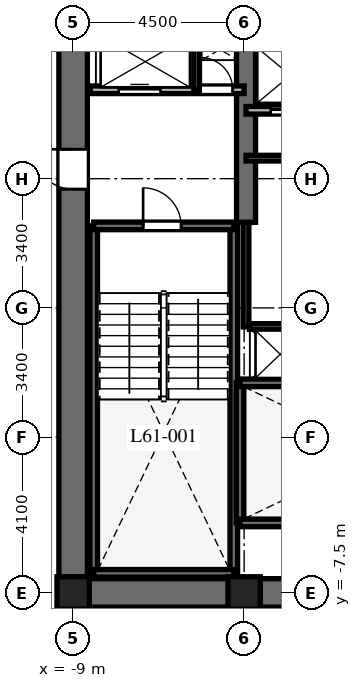
"""IFC4 building model, lengths in metres.
Left out: names, types, materials, properties, quantities, classifications, styles, units other than length and angle.
Written with IfcOpenShell. Run it as: python <this file> out.ifc"""

import sys

from ifc_helpers import new_model, si_unit, direction, frame, frame_2d, origin, origin_2d, place, context, subcontext, project, spatial, rectangle, extrude, element, fill, save


model = new_model("IFC4")
c1 = context("Model", 3, precision=1e-05, world=origin(), true_north=direction((0.0, 1.0)))
c2 = subcontext(c1, "Body", "Model", "MODEL_VIEW")
j1 = project(units=[si_unit("LENGTHUNIT", "METRE"), si_unit("PLANEANGLEUNIT", "RADIAN")], contexts=[c1])
p1 = place(None, origin())
s1 = spatial("IfcSite", under=j1, at=p1, CompositionType="ELEMENT")
p2 = place(p1, origin())
s2 = spatial("IfcBuilding", under=s1, at=p2, CompositionType="ELEMENT")
p3 = place(p2, frame((0.0, 0.0, 244.5)))
s3 = spatial("IfcBuildingStorey", under=s2, at=p3, CompositionType="ELEMENT", Elevation=244.5)
p4 = place(p3, frame((-9.375, -7.5, 0.0), z_axis=(0.0, 0.0, 1.0), x_axis=(1.0, 0.0, 0.0)))
e1 = element("IfcWall", 1, at=p4, inside=s3, PredefinedType="SHEAR", context=c2, shape_type="SweptSolid", body=[
    extrude(rectangle(XDim=18.75, YDim=0.75, at=frame_2d((9.375, 0.0))), origin(), (0.0, 0.0, 1.0), 3.8),
])
p5 = place(p4, frame((9.425, 0.0, 0.0)))
e2 = element("IfcOpeningElement", 2, at=p5, cuts=e1, PredefinedType="OPENING", context=c2, shape_type="SweptSolid", body=[
    extrude(rectangle(XDim=1.0, YDim=2.15, at=frame_2d((0.5, 1.075))), frame((0.0, 0.385, 0.0), z_axis=(0.0, -1.0, 0.0), x_axis=(1.0, 0.0, 0.0)), (0.0, 0.0, 1.0), 0.77),
])
p6 = place(p3, frame((-9.0, -7.125, 0.0), z_axis=(0.0, 0.0, 1.0), x_axis=(0.0, 1.0, 0.0)))
e3 = element("IfcWall", 3, at=p6, inside=s3, PredefinedType="SHEAR", context=c2, shape_type="SweptSolid", body=[
    extrude(rectangle(XDim=14.25, YDim=0.75, at=frame_2d((7.125, 0.0))), origin(), (0.0, 0.0, 1.0), 3.8),
])
p7 = place(p6, frame((10.25, 0.0, 0.0)))
e4 = element("IfcOpeningElement", 4, at=p7, cuts=e3, PredefinedType="OPENING", context=c2, shape_type="SweptSolid", body=[
    extrude(rectangle(XDim=1.05, YDim=2.15, at=frame_2d((0.525, 1.075))), frame((0.0, 0.385, 0.0), z_axis=(0.0, -1.0, 0.0), x_axis=(1.0, 0.0, 0.0)), (0.0, 0.0, 1.0), 0.77),
])
p8 = place(p3, frame((-4.45, 2.25, 0.0), z_axis=(0.0, 0.0, 1.0), x_axis=(0.0, 1.0, 0.0)))
e5 = element("IfcWall", 5, at=p8, inside=s3, PredefinedType="SHEAR", context=c2, shape_type="SweptSolid", body=[
    extrude(rectangle(XDim=4.875, YDim=0.5, at=frame_2d((2.438, 0.0))), origin(), (0.0, 0.0, 1.0), 3.8),
])
for number, where, z_axis, x_axis in (
    (6, (-8.458, -6.985, 0.0), (0.0, 0.0, 1.0), (0.0, 1.0, 0.0)),
    (7, (-4.772, -6.985, 0.0), (0.0, 0.0, 1.0), (0.0, 1.0, 0.0)),
):
    element("IfcWall", number, at=place(p3, frame(where, z_axis=z_axis, x_axis=x_axis)), inside=s3, PredefinedType="SHEAR", context=c2, shape_type="SweptSolid", body=[
        extrude(rectangle(XDim=9.143, YDim=0.2, at=frame_2d((4.572, 0.0))), origin(), (0.0, 0.0, 1.0), 3.8),
    ])
p9 = place(p3, frame((-8.458, -6.985, 0.0), z_axis=(0.0, 0.0, 1.0), x_axis=(1.0, 0.0, 0.0)))
e8 = element("IfcWall", 8, at=p9, inside=s3, PredefinedType="SHEAR", context=c2, shape_type="SweptSolid", body=[
    extrude(rectangle(XDim=3.686, YDim=0.2, at=frame_2d((1.843, 0.0))), origin(), (0.0, 0.0, 1.0), 3.8),
])
p10 = place(p3, frame((-8.458, 2.158, 0.0), z_axis=(0.0, 0.0, 1.0), x_axis=(1.0, 0.0, 0.0)))
e9 = element("IfcWall", 9, at=p10, inside=s3, PredefinedType="SHEAR", context=c2, shape_type="SweptSolid", body=[
    extrude(rectangle(XDim=3.686, YDim=0.2, at=frame_2d((1.843, 0.0))), origin(), (0.0, 0.0, 1.0), 3.8),
])
p11 = place(p10, frame((1.3, 0.0, 0.0)))
e10 = element("IfcOpeningElement", 10, at=p11, cuts=e9, PredefinedType="OPENING", context=c2, shape_type="SweptSolid", body=[
    extrude(rectangle(XDim=1.0, YDim=2.15, at=frame_2d((0.5, 1.075))), frame((0.0, 0.11, 0.0), z_axis=(0.0, -1.0, 0.0), x_axis=(1.0, 0.0, 0.0)), (0.0, 0.0, 1.0), 0.22),
])
p12 = place(p3, frame((-4.608, -5.658, 0.0), z_axis=(0.0, 0.0, 1.0), x_axis=(0.0, 1.0, 0.0)))
e11 = element("IfcWall", 11, at=p12, inside=s3, PredefinedType="SHEAR", context=c2, shape_type="SweptSolid", body=[
    extrude(rectangle(XDim=3.686, YDim=0.2, at=frame_2d((1.843, 0.0))), origin(), (0.0, 0.0, 1.0), 3.8),
])
p13 = place(p3, frame((-4.608, -5.658, 0.0), z_axis=(0.0, 0.0, 1.0), x_axis=(1.0, 0.0, 0.0)))
e12 = element("IfcWall", 12, at=p13, inside=s3, PredefinedType="SHEAR", context=c2, shape_type="SweptSolid", body=[
    extrude(rectangle(XDim=9.166, YDim=0.2, at=frame_2d((4.583, 0.0))), origin(), (0.0, 0.0, 1.0), 3.8),
])
p14 = place(p13, frame((7.45, 0.0, 0.0)))
e13 = element("IfcOpeningElement", 13, at=p14, cuts=e12, PredefinedType="OPENING", context=c2, shape_type="SweptSolid", body=[
    extrude(rectangle(XDim=1.0, YDim=2.15, at=frame_2d((0.5, 1.075))), frame((0.0, 0.11, 0.0), z_axis=(0.0, -1.0, 0.0), x_axis=(1.0, 0.0, 0.0)), (0.0, 0.0, 1.0), 0.22),
])
p15 = place(p3, frame((-4.608, -1.972, 0.0), z_axis=(0.0, 0.0, 1.0), x_axis=(1.0, 0.0, 0.0)))
e14 = element("IfcWall", 14, at=p15, inside=s3, PredefinedType="SHEAR", context=c2, shape_type="SweptSolid", body=[
    extrude(rectangle(XDim=9.166, YDim=0.2, at=frame_2d((4.583, 0.0))), origin(), (0.0, 0.0, 1.0), 3.8),
])
for number, where, z_axis, x_axis in (
    (15, (-9.0, -7.5, 0.0), (0.0, 0.0, 1.0), (1.0, 0.0, 0.0)),
    (16, (-4.5, -7.5, 0.0), (0.0, 0.0, 1.0), (1.0, 0.0, 0.0)),
):
    element("IfcColumn", number, at=place(p3, frame(where, z_axis=z_axis, x_axis=x_axis)), inside=s3, PredefinedType="COLUMN", context=c2, shape_type="SweptSolid", body=[
        extrude(rectangle(XDim=0.85, YDim=0.85, at=origin_2d()), origin(), (0.0, 0.0, 1.0), 3.8),
    ])
p16 = place(p3, frame((-8.55, 5.74, 0.0), z_axis=(0.0, 0.0, 1.0), x_axis=(1.0, 0.0, 0.0)))
e17 = element("IfcWall", 17, at=p16, inside=s3, PredefinedType="PARTITIONING", context=c2, shape_type="SweptSolid", body=[
    extrude(rectangle(XDim=4.05, YDim=0.2, at=frame_2d((2.025, 0.0))), origin(), (0.0, 0.0, 1.0), 3.5),
])
p17 = place(p16, frame((0.75, 0.0, 0.0)))
e18 = element("IfcOpeningElement", 18, at=p17, cuts=e17, PredefinedType="OPENING", context=c2, shape_type="SweptSolid", body=[
    extrude(rectangle(XDim=1.1, YDim=2.2, at=frame_2d((0.55, 1.1))), frame((0.0, 0.11, 0.0), z_axis=(0.0, -1.0, 0.0), x_axis=(1.0, 0.0, 0.0)), (0.0, 0.0, 1.0), 0.22),
])
p18 = place(p16, frame((2.9, 0.0, 0.0)))
e19 = element("IfcOpeningElement", 19, at=p18, cuts=e17, PredefinedType="OPENING", context=c2, shape_type="SweptSolid", body=[
    extrude(rectangle(XDim=0.85, YDim=2.03, at=frame_2d((0.425, 1.015))), frame((0.0, 0.11, 0.0), z_axis=(0.0, -1.0, 0.0), x_axis=(1.0, 0.0, 0.0)), (0.0, 0.0, 1.0), 0.22),
])
p19 = place(p3, frame((-5.75, 5.74, 0.0), z_axis=(0.0, 0.0, 1.0), x_axis=(0.0, 1.0, 0.0)))
e20 = element("IfcWall", 20, at=p19, inside=s3, PredefinedType="PARTITIONING", context=c2, shape_type="SweptSolid", body=[
    extrude(rectangle(XDim=1.41, YDim=0.15, at=frame_2d((0.705, 0.0))), origin(), (0.0, 0.0, 1.0), 3.5),
])
p20 = place(p3, frame((-4.45, 5.2, 0.0), z_axis=(0.0, 0.0, 1.0), x_axis=(1.0, 0.0, 0.0)))
e21 = element("IfcWall", 21, at=p20, inside=s3, PredefinedType="PARTITIONING", context=c2, shape_type="SweptSolid", body=[
    extrude(rectangle(XDim=4.5, YDim=0.2, at=frame_2d((2.25, 0.0))), origin(), (0.0, 0.0, 1.0), 3.5),
])
p21 = place(p20, frame((0.65, 0.0, 0.0)))
e22 = element("IfcOpeningElement", 22, at=p21, cuts=e21, PredefinedType="OPENING", context=c2, shape_type="SweptSolid", body=[
    extrude(rectangle(XDim=1.0, YDim=2.2, at=frame_2d((0.5, 1.1))), frame((0.0, 0.11, 0.0), z_axis=(0.0, -1.0, 0.0), x_axis=(1.0, 0.0, 0.0)), (0.0, 0.0, 1.0), 0.22),
])
p22 = place(p20, frame((2.85, 0.0, 0.0)))
e23 = element("IfcOpeningElement", 23, at=p22, cuts=e21, PredefinedType="OPENING", context=c2, shape_type="SweptSolid", body=[
    extrude(rectangle(XDim=1.0, YDim=2.2, at=frame_2d((0.5, 1.1))), frame((0.0, 0.11, 0.0), z_axis=(0.0, -1.0, 0.0), x_axis=(1.0, 0.0, 0.0)), (0.0, 0.0, 1.0), 0.22),
])
p23 = place(p3, frame((-4.45, -0.5, 0.0), z_axis=(0.0, 0.0, 1.0), x_axis=(0.0, 1.0, 0.0)))
e24 = element("IfcWall", 24, at=p23, inside=s3, PredefinedType="PARTITIONING", context=c2, shape_type="SweptSolid", body=[
    extrude(rectangle(XDim=2.75, YDim=0.15, at=frame_2d((1.375, 0.0))), origin(), (0.0, 0.0, 1.0), 3.5),
])
p24 = place(p3, frame((-4.45, 3.94, 0.0), z_axis=(0.0, 0.0, 1.0), x_axis=(1.0, 0.0, 0.0)))
e25 = element("IfcWall", 25, at=p24, inside=s3, PredefinedType="PARTITIONING", context=c2, shape_type="SweptSolid", body=[
    extrude(rectangle(XDim=2.55, YDim=0.15, at=frame_2d((1.275, 0.0))), origin(), (0.0, 0.0, 1.0), 3.5),
])
p25 = place(p3, frame((-4.36, -0.49, 0.0), z_axis=(0.0, 0.0, 1.0), x_axis=(1.0, 0.0, 0.0)))
e26 = element("IfcWall", 26, at=p25, inside=s3, PredefinedType="PARTITIONING", context=c2, shape_type="SweptSolid", body=[
    extrude(rectangle(XDim=8.72, YDim=0.15, at=frame_2d((4.36, 0.0))), origin(), (0.0, 0.0, 1.0), 3.5),
])
p26 = place(p25, frame((3.16, 0.0, 0.0)))
e27 = element("IfcOpeningElement", 27, at=p26, cuts=e26, PredefinedType="OPENING", context=c2, shape_type="SweptSolid", body=[
    extrude(rectangle(XDim=0.85, YDim=2.03, at=frame_2d((0.425, 1.015))), frame((0.0, 0.085, 0.0), z_axis=(0.0, -1.0, 0.0), x_axis=(1.0, 0.0, 0.0)), (0.0, 0.0, 1.0), 0.17),
])
p27 = place(p25, frame((5.21, 0.0, 0.0)))
e28 = element("IfcOpeningElement", 28, at=p27, cuts=e26, PredefinedType="OPENING", context=c2, shape_type="SweptSolid", body=[
    extrude(rectangle(XDim=0.85, YDim=2.03, at=frame_2d((0.425, 1.015))), frame((0.0, 0.085, 0.0), z_axis=(0.0, -1.0, 0.0), x_axis=(1.0, 0.0, 0.0)), (0.0, 0.0, 1.0), 0.17),
])
p28 = place(p11, origin())
e29 = element("IfcDoor", 29, at=p28, inside=s3, OperationType="SINGLE_SWING_LEFT", PredefinedType="DOOR", context=c2, shape_type="SweptSolid", body=[
    extrude(rectangle(XDim=1.0, YDim=2.15, at=frame_2d((0.5, 1.075))), frame((0.0, 0.025, 0.0), z_axis=(0.0, -1.0, 0.0), x_axis=(1.0, 0.0, 0.0)), (0.0, 0.0, 1.0), 0.05),
])
fill(e10, e29)
p29 = place(p7, origin())
e30 = element("IfcDoor", 30, at=p29, inside=s3, OperationType="SINGLE_SWING_RIGHT", PredefinedType="DOOR", context=c2, shape_type="SweptSolid", body=[
    extrude(rectangle(XDim=1.05, YDim=2.15, at=frame_2d((0.525, 1.075))), frame((0.0, 0.025, 0.0), z_axis=(0.0, -1.0, 0.0), x_axis=(1.0, 0.0, 0.0)), (0.0, 0.0, 1.0), 0.05),
])
fill(e4, e30)
p30 = place(p17, origin())
e31 = element("IfcDoor", 31, at=p30, inside=s3, OperationType="SLIDING_TO_LEFT", PredefinedType="DOOR", context=c2, shape_type="SweptSolid", body=[
    extrude(rectangle(XDim=1.1, YDim=2.2, at=frame_2d((0.55, 1.1))), frame((0.0, 0.025, 0.0), z_axis=(0.0, -1.0, 0.0), x_axis=(1.0, 0.0, 0.0)), (0.0, 0.0, 1.0), 0.05),
])
fill(e18, e31)
p31 = place(p18, origin())
e32 = element("IfcDoor", 32, at=p31, inside=s3, OperationType="SINGLE_SWING_LEFT", PredefinedType="DOOR", context=c2, shape_type="SweptSolid", body=[
    extrude(rectangle(XDim=0.85, YDim=2.03, at=frame_2d((0.425, 1.015))), frame((0.0, 0.025, 0.0), z_axis=(0.0, -1.0, 0.0), x_axis=(1.0, 0.0, 0.0)), (0.0, 0.0, 1.0), 0.05),
])
fill(e19, e32)
p32 = place(p21, origin())
e33 = element("IfcDoor", 33, at=p32, inside=s3, OperationType="SLIDING_TO_LEFT", PredefinedType="DOOR", context=c2, shape_type="SweptSolid", body=[
    extrude(rectangle(XDim=1.0, YDim=2.2, at=frame_2d((0.5, 1.1))), frame((0.0, 0.025, 0.0), z_axis=(0.0, -1.0, 0.0), x_axis=(1.0, 0.0, 0.0)), (0.0, 0.0, 1.0), 0.05),
])
fill(e22, e33)
save(model, sys.argv[1])
